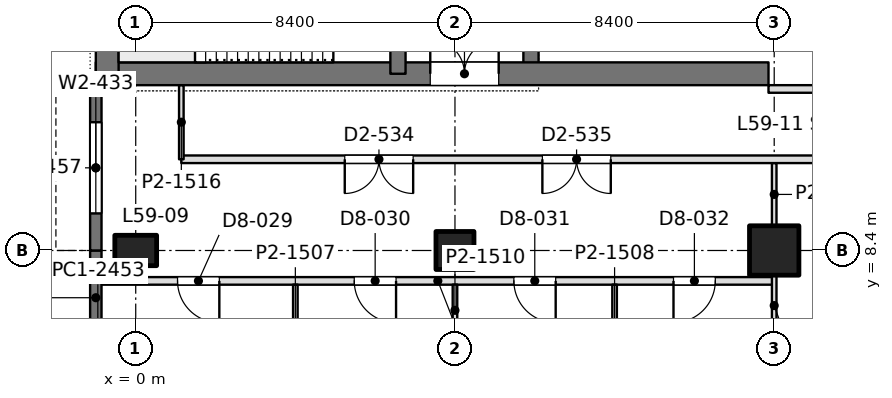
"""IFC4 building model, lengths in metres.
Left out: names, types, materials, properties, quantities, classifications, styles, units other than length and angle.
Written with IfcOpenShell. Run it as: python <this file> out.ifc"""

import sys

from ifc_helpers import new_model, si_unit, direction, frame, frame_2d, origin, origin_2d, place, context, subcontext, project, spatial, rectangle, extrude, element, fill, save


model = new_model("IFC4")
c1 = context("Model", 3, precision=1e-05, world=origin(), true_north=direction((0.0, 1.0)))
c2 = subcontext(c1, "Body", "Model", "MODEL_VIEW")
j1 = project(units=[si_unit("LENGTHUNIT", "METRE"), si_unit("PLANEANGLEUNIT", "RADIAN")], contexts=[c1])
p1 = place(None, origin())
s1 = spatial("IfcSite", under=j1, at=p1, CompositionType="ELEMENT")
p2 = place(p1, origin())
s2 = spatial("IfcBuilding", under=s1, at=p2, CompositionType="ELEMENT")
p3 = place(p2, frame((0.0, 0.0, 259.2)))
s3 = spatial("IfcBuildingStorey", under=s2, at=p3, CompositionType="ELEMENT", Elevation=259.2)
p4 = place(p3, frame((0.0, 8.4, 0.0), z_axis=(0.0, 0.0, 1.0), x_axis=(0.0, 1.0, 0.0)))
e1 = element("IfcColumn", 1, at=p4, inside=s3, PredefinedType="COLUMN", context=c2, shape_type="SweptSolid", body=[
    extrude(rectangle(XDim=0.8, YDim=1.1, at=origin_2d()), origin(), (0.0, 0.0, 1.0), 4.5),
])
p5 = place(p3, frame((8.4, 8.4, 0.0), z_axis=(0.0, 0.0, 1.0), x_axis=(1.0, 0.0, 0.0)))
e2 = element("IfcColumn", 2, at=p5, inside=s3, PredefinedType="COLUMN", context=c2, shape_type="SweptSolid", body=[
    extrude(rectangle(XDim=1.0, YDim=1.0, at=origin_2d()), origin(), (0.0, 0.0, 1.0), 4.5),
])
p6 = place(p3, frame((16.8, 8.4, 0.0), z_axis=(0.0, 0.0, 1.0), x_axis=(1.0, 0.0, 0.0)))
e3 = element("IfcColumn", 3, at=p6, inside=s3, PredefinedType="COLUMN", context=c2, shape_type="SweptSolid", body=[
    extrude(rectangle(XDim=1.3, YDim=1.3, at=origin_2d()), origin(), (0.0, 0.0, 1.0), 4.5),
])
p7 = place(p3, frame((-1.05, 13.05, 0.0), z_axis=(0.0, 0.0, 1.0), x_axis=(1.0, 0.0, 0.0)))
e4 = element("IfcWall", 4, at=p7, inside=s3, PredefinedType="SHEAR", context=c2, shape_type="SweptSolid", body=[
    extrude(rectangle(XDim=17.7, YDim=0.6, at=frame_2d((8.85, 0.0))), origin(), (0.0, 0.0, 1.0), 4.5),
])
p8 = place(p7, frame((8.8, 0.0, 0.0)))
e5 = element("IfcOpeningElement", 5, at=p8, cuts=e4, PredefinedType="OPENING", context=c2, shape_type="SweptSolid", body=[
    extrude(rectangle(XDim=1.8, YDim=2.4, at=frame_2d((0.9, 1.2))), frame((0.0, 0.31, 0.0), z_axis=(0.0, -1.0, 0.0), x_axis=(1.0, 0.0, 0.0)), (0.0, 0.0, 1.0), 0.62),
])
p9 = place(p3, frame((-0.75, 13.05, 0.0), z_axis=(0.0, 0.0, 1.0), x_axis=(0.0, 1.0, 0.0)))
e6 = element("IfcWall", 6, at=p9, inside=s3, PredefinedType="SHEAR", context=c2, shape_type="SweptSolid", body=[
    extrude(rectangle(XDim=24.3, YDim=0.6, at=frame_2d((12.15, 0.0))), origin(), (0.0, 0.0, 1.0), 4.5),
])
p10 = place(p3, frame((6.9, 13.05, 0.0), z_axis=(0.0, 0.0, 1.0), x_axis=(0.0, 1.0, 0.0)))
e7 = element("IfcWall", 7, at=p10, inside=s3, PredefinedType="SHEAR", context=c2, shape_type="SweptSolid", body=[
    extrude(rectangle(XDim=24.3, YDim=0.4, at=frame_2d((12.15, 0.0))), origin(), (0.0, 0.0, 1.0), 4.5),
])
p11 = place(p10, frame((1.3, 0.0, 0.0)))
e8 = element("IfcOpeningElement", 8, at=p11, cuts=e7, PredefinedType="OPENING", context=c2, shape_type="SweptSolid", body=[
    extrude(rectangle(XDim=1.0, YDim=2.2, at=frame_2d((0.5, 1.1))), frame((0.0, 0.21, 0.0), z_axis=(0.0, -1.0, 0.0), x_axis=(1.0, 0.0, 0.0)), (0.0, 0.0, 1.0), 0.42),
])
p12 = place(p10, frame((22.0, 0.0, 0.0)))
e9 = element("IfcOpeningElement", 9, at=p12, cuts=e7, PredefinedType="OPENING", context=c2, shape_type="SweptSolid", body=[
    extrude(rectangle(XDim=1.0, YDim=2.2, at=frame_2d((0.5, 1.1))), frame((0.0, 0.21, 0.0), z_axis=(0.0, -1.0, 0.0), x_axis=(1.0, 0.0, 0.0)), (0.0, 0.0, 1.0), 0.42),
])
p13 = place(p10, frame((5.55, 0.0, 0.0)))
e10 = element("IfcOpeningElement", 10, at=p13, cuts=e7, PredefinedType="OPENING", context=c2, shape_type="SweptSolid", body=[
    extrude(rectangle(XDim=1.0, YDim=2.2, at=frame_2d((0.5, 1.1))), frame((0.0, 0.21, 0.0), z_axis=(0.0, -1.0, 0.0), x_axis=(1.0, 0.0, 0.0)), (0.0, 0.0, 1.0), 0.42),
])
p14 = place(p10, frame((9.55, 0.0, 0.0)))
e11 = element("IfcOpeningElement", 11, at=p14, cuts=e7, PredefinedType="OPENING", context=c2, shape_type="SweptSolid", body=[
    extrude(rectangle(XDim=1.0, YDim=2.2, at=frame_2d((0.5, 1.1))), frame((0.0, 0.21, 0.0), z_axis=(0.0, -1.0, 0.0), x_axis=(1.0, 0.0, 0.0)), (0.0, 0.0, 1.0), 0.42),
])
p15 = place(p10, frame((12.8, 0.0, 0.0)))
e12 = element("IfcOpeningElement", 12, at=p15, cuts=e7, PredefinedType="OPENING", context=c2, shape_type="SweptSolid", body=[
    extrude(rectangle(XDim=1.1, YDim=2.2, at=frame_2d((0.55, 1.1))), frame((0.0, 0.21, 0.0), z_axis=(0.0, -1.0, 0.0), x_axis=(1.0, 0.0, 0.0)), (0.0, 0.0, 1.0), 0.42),
])
p16 = place(p10, frame((15.538, 0.0, 0.0)))
e13 = element("IfcOpeningElement", 13, at=p16, cuts=e7, PredefinedType="OPENING", context=c2, shape_type="SweptSolid", body=[
    extrude(rectangle(XDim=1.1, YDim=2.2, at=frame_2d((0.55, 1.1))), frame((0.0, 0.21, 0.0), z_axis=(0.0, -1.0, 0.0), x_axis=(1.0, 0.0, 0.0)), (0.0, 0.0, 1.0), 0.42),
])
p17 = place(p10, frame((18.262, 0.0, 0.0)))
e14 = element("IfcOpeningElement", 14, at=p17, cuts=e7, PredefinedType="OPENING", context=c2, shape_type="SweptSolid", body=[
    extrude(rectangle(XDim=1.1, YDim=2.2, at=frame_2d((0.55, 1.1))), frame((0.0, 0.21, 0.0), z_axis=(0.0, -1.0, 0.0), x_axis=(1.0, 0.0, 0.0)), (0.0, 0.0, 1.0), 0.42),
])
p18 = place(p3, frame((10.4, 13.05, 0.0), z_axis=(0.0, 0.0, 1.0), x_axis=(0.0, 1.0, 0.0)))
e15 = element("IfcWall", 15, at=p18, inside=s3, PredefinedType="SHEAR", context=c2, shape_type="SweptSolid", body=[
    extrude(rectangle(XDim=24.3, YDim=0.4, at=frame_2d((12.15, 0.0))), origin(), (0.0, 0.0, 1.0), 4.5),
])
p19 = place(p18, frame((15.75, 0.0, 0.0)))
e16 = element("IfcOpeningElement", 16, at=p19, cuts=e15, PredefinedType="OPENING", context=c2, shape_type="SweptSolid", body=[
    extrude(rectangle(XDim=1.1, YDim=2.2, at=frame_2d((0.55, 1.1))), frame((0.0, 0.21, 0.0), z_axis=(0.0, -1.0, 0.0), x_axis=(1.0, 0.0, 0.0)), (0.0, 0.0, 1.0), 0.42),
])
p20 = place(p18, frame((18.6, 0.0, 0.0)))
e17 = element("IfcOpeningElement", 17, at=p20, cuts=e15, PredefinedType="OPENING", context=c2, shape_type="SweptSolid", body=[
    extrude(rectangle(XDim=1.1, YDim=2.2, at=frame_2d((0.55, 1.1))), frame((0.0, 0.21, 0.0), z_axis=(0.0, -1.0, 0.0), x_axis=(1.0, 0.0, 0.0)), (0.0, 0.0, 1.0), 0.42),
])
p21 = place(p18, frame((21.45, 0.0, 0.0)))
e18 = element("IfcOpeningElement", 18, at=p21, cuts=e15, PredefinedType="OPENING", context=c2, shape_type="SweptSolid", body=[
    extrude(rectangle(XDim=1.1, YDim=2.2, at=frame_2d((0.55, 1.1))), frame((0.0, 0.21, 0.0), z_axis=(0.0, -1.0, 0.0), x_axis=(1.0, 0.0, 0.0)), (0.0, 0.0, 1.0), 0.42),
])
p22 = place(p18, frame((8.65, 0.0, 0.0)))
e19 = element("IfcOpeningElement", 19, at=p22, cuts=e15, PredefinedType="OPENING", context=c2, shape_type="SweptSolid", body=[
    extrude(rectangle(XDim=1.8, YDim=2.4, at=frame_2d((0.9, 1.2))), frame((0.0, 0.21, 0.0), z_axis=(0.0, -1.0, 0.0), x_axis=(1.0, 0.0, 0.0)), (0.0, 0.0, 1.0), 0.42),
])
p23 = place(p3, frame((-1.05, 5.915, 0.0), z_axis=(0.0, 0.0, 1.0), x_axis=(0.0, 1.0, 0.0)))
e20 = element("IfcWall", 20, at=p23, inside=s3, PredefinedType="SOLIDWALL", context=c2, shape_type="SweptSolid", body=[
    extrude(rectangle(XDim=2.485, YDim=0.3, at=frame_2d((1.243, 0.0))), origin(), (0.0, 0.0, 1.0), 4.35),
])
p24 = place(p3, frame((-1.05, 8.4, 0.0), z_axis=(0.0, 0.0, 1.0), x_axis=(0.0, 1.0, 0.0)))
e21 = element("IfcWall", 21, at=p24, inside=s3, PredefinedType="SOLIDWALL", context=c2, shape_type="SweptSolid", body=[
    extrude(rectangle(XDim=4.35, YDim=0.3, at=frame_2d((2.175, 0.0))), origin(), (0.0, 0.0, 1.0), 4.35),
])
p25 = place(p24, frame((0.975, 0.0, 0.9)))
e22 = element("IfcOpeningElement", 22, at=p25, cuts=e21, PredefinedType="OPENING", context=c2, shape_type="SweptSolid", body=[
    extrude(rectangle(XDim=2.4, YDim=1.9, at=frame_2d((1.2, 0.95))), frame((0.0, 0.16, 0.0), z_axis=(0.0, -1.0, 0.0), x_axis=(1.0, 0.0, 0.0)), (0.0, 0.0, 1.0), 0.32),
])
p26 = place(p3, frame((-0.902, 7.6, 0.0), z_axis=(0.0, 0.0, 1.0), x_axis=(1.0, 0.0, 0.0)))
e23 = element("IfcWall", 23, at=p26, inside=s3, PredefinedType="PARTITIONING", context=c2, shape_type="SweptSolid", body=[
    extrude(rectangle(XDim=17.702, YDim=0.2, at=frame_2d((8.851, 0.0))), origin(), (0.0, 0.0, 1.0), 3.86),
])
p27 = place(p26, frame((2.002, 0.0, 0.0)))
e24 = element("IfcOpeningElement", 24, at=p27, cuts=e23, PredefinedType="OPENING", context=c2, shape_type="SweptSolid", body=[
    extrude(rectangle(XDim=1.1, YDim=2.4, at=frame_2d((0.55, 1.2))), frame((0.0, 0.11, 0.0), z_axis=(0.0, -1.0, 0.0), x_axis=(1.0, 0.0, 0.0)), (0.0, 0.0, 1.0), 0.22),
])
p28 = place(p26, frame((6.652, 0.0, 0.0)))
e25 = element("IfcOpeningElement", 25, at=p28, cuts=e23, PredefinedType="OPENING", context=c2, shape_type="SweptSolid", body=[
    extrude(rectangle(XDim=1.1, YDim=2.4, at=frame_2d((0.55, 1.2))), frame((0.0, 0.11, 0.0), z_axis=(0.0, -1.0, 0.0), x_axis=(1.0, 0.0, 0.0)), (0.0, 0.0, 1.0), 0.22),
])
p29 = place(p26, frame((10.852, 0.0, 0.0)))
e26 = element("IfcOpeningElement", 26, at=p29, cuts=e23, PredefinedType="OPENING", context=c2, shape_type="SweptSolid", body=[
    extrude(rectangle(XDim=1.1, YDim=2.4, at=frame_2d((0.55, 1.2))), frame((0.0, 0.11, 0.0), z_axis=(0.0, -1.0, 0.0), x_axis=(1.0, 0.0, 0.0)), (0.0, 0.0, 1.0), 0.22),
])
p30 = place(p26, frame((15.052, 0.0, 0.0)))
e27 = element("IfcOpeningElement", 27, at=p30, cuts=e23, PredefinedType="OPENING", context=c2, shape_type="SweptSolid", body=[
    extrude(rectangle(XDim=1.1, YDim=2.4, at=frame_2d((0.55, 1.2))), frame((0.0, 0.11, 0.0), z_axis=(0.0, -1.0, 0.0), x_axis=(1.0, 0.0, 0.0)), (0.0, 0.0, 1.0), 0.22),
])
p31 = place(p3, frame((4.2, 4.7, 0.0), z_axis=(0.0, 0.0, 1.0), x_axis=(0.0, 1.0, 0.0)))
e28 = element("IfcWall", 28, at=p31, inside=s3, PredefinedType="PARTITIONING", context=c2, shape_type="SweptSolid", body=[
    extrude(rectangle(XDim=2.802, YDim=0.12, at=frame_2d((1.401, 0.0))), origin(), (0.0, 0.0, 1.0), 3.86),
])
p32 = place(p3, frame((8.4, 6.149, 0.0), z_axis=(0.0, 0.0, 1.0), x_axis=(0.0, 1.0, 0.0)))
e29 = element("IfcWall", 29, at=p32, inside=s3, PredefinedType="PARTITIONING", context=c2, shape_type="SweptSolid", body=[
    extrude(rectangle(XDim=1.353, YDim=0.12, at=frame_2d((0.677, 0.0))), origin(), (0.0, 0.0, 1.0), 3.99),
])
p33 = place(p3, frame((12.6, 4.7, 0.0), z_axis=(0.0, 0.0, 1.0), x_axis=(0.0, 1.0, 0.0)))
e30 = element("IfcWall", 30, at=p33, inside=s3, PredefinedType="PARTITIONING", context=c2, shape_type="SweptSolid", body=[
    extrude(rectangle(XDim=2.802, YDim=0.12, at=frame_2d((1.401, 0.0))), origin(), (0.0, 0.0, 1.0), 3.86),
])
p34 = place(p3, frame((16.8, 6.149, 0.0), z_axis=(0.0, 0.0, 1.0), x_axis=(0.0, 1.0, 0.0)))
e31 = element("IfcWall", 31, at=p34, inside=s3, PredefinedType="PARTITIONING", context=c2, shape_type="SweptSolid", body=[
    extrude(rectangle(XDim=1.603, YDim=0.12, at=frame_2d((0.802, 0.0))), origin(), (0.0, 0.0, 1.0), 3.99),
])
p35 = place(p3, frame((16.8, 9.049, 0.0), z_axis=(0.0, 0.0, 1.0), x_axis=(0.0, 1.0, 0.0)))
e32 = element("IfcWall", 32, at=p35, inside=s3, PredefinedType="PARTITIONING", context=c2, shape_type="SweptSolid", body=[
    extrude(rectangle(XDim=1.653, YDim=0.12, at=frame_2d((0.826, 0.0))), origin(), (0.0, 0.0, 1.0), 3.99),
])
p36 = place(p3, frame((1.2, 10.8, 0.0), z_axis=(0.0, 0.0, 1.0), x_axis=(1.0, 0.0, 0.0)))
e33 = element("IfcWall", 33, at=p36, inside=s3, PredefinedType="PARTITIONING", context=c2, shape_type="SweptSolid", body=[
    extrude(rectangle(XDim=41.452, YDim=0.2, at=frame_2d((20.726, 0.0))), origin(), (0.0, 0.0, 1.0), 3.8),
])
p37 = place(p36, frame((4.3, 0.0, 0.0)))
e34 = element("IfcOpeningElement", 34, at=p37, cuts=e33, PredefinedType="OPENING", context=c2, shape_type="SweptSolid", body=[
    extrude(rectangle(XDim=1.8, YDim=2.2, at=frame_2d((0.9, 1.1))), frame((0.0, 0.11, 0.0), z_axis=(0.0, -1.0, 0.0), x_axis=(1.0, 0.0, 0.0)), (0.0, 0.0, 1.0), 0.22),
])
p38 = place(p36, frame((9.5, 0.0, 0.0)))
e35 = element("IfcOpeningElement", 35, at=p38, cuts=e33, PredefinedType="OPENING", context=c2, shape_type="SweptSolid", body=[
    extrude(rectangle(XDim=1.8, YDim=2.2, at=frame_2d((0.9, 1.1))), frame((0.0, 0.11, 0.0), z_axis=(0.0, -1.0, 0.0), x_axis=(1.0, 0.0, 0.0)), (0.0, 0.0, 1.0), 0.22),
])
p39 = place(p36, frame((20.3, 0.0, 0.0)))
e36 = element("IfcOpeningElement", 36, at=p39, cuts=e33, PredefinedType="OPENING", context=c2, shape_type="SweptSolid", body=[
    extrude(rectangle(XDim=1.8, YDim=2.2, at=frame_2d((0.9, 1.1))), frame((0.0, 0.11, 0.0), z_axis=(0.0, -1.0, 0.0), x_axis=(1.0, 0.0, 0.0)), (0.0, 0.0, 1.0), 0.22),
])
p40 = place(p36, frame((25.9, 0.0, 0.0)))
e37 = element("IfcOpeningElement", 37, at=p40, cuts=e33, PredefinedType="OPENING", context=c2, shape_type="SweptSolid", body=[
    extrude(rectangle(XDim=1.8, YDim=2.2, at=frame_2d((0.9, 1.1))), frame((0.0, 0.11, 0.0), z_axis=(0.0, -1.0, 0.0), x_axis=(1.0, 0.0, 0.0)), (0.0, 0.0, 1.0), 0.22),
])
p41 = place(p36, frame((34.517, 0.0, 0.0)))
e38 = element("IfcOpeningElement", 38, at=p41, cuts=e33, PredefinedType="OPENING", context=c2, shape_type="SweptSolid", body=[
    extrude(rectangle(XDim=1.8, YDim=2.2, at=frame_2d((0.9, 1.1))), frame((0.0, 0.11, 0.0), z_axis=(0.0, -1.0, 0.0), x_axis=(1.0, 0.0, 0.0)), (0.0, 0.0, 1.0), 0.22),
])
p42 = place(p36, frame((37.533, 0.0, 0.0)))
e39 = element("IfcOpeningElement", 39, at=p42, cuts=e33, PredefinedType="OPENING", context=c2, shape_type="SweptSolid", body=[
    extrude(rectangle(XDim=1.8, YDim=2.2, at=frame_2d((0.9, 1.1))), frame((0.0, 0.11, 0.0), z_axis=(0.0, -1.0, 0.0), x_axis=(1.0, 0.0, 0.0)), (0.0, 0.0, 1.0), 0.22),
])
p43 = place(p3, frame((1.2, 10.8, 0.0), z_axis=(0.0, 0.0, 1.0), x_axis=(0.0, 1.0, 0.0)))
e40 = element("IfcWall", 40, at=p43, inside=s3, PredefinedType="PARTITIONING", context=c2, shape_type="SweptSolid", body=[
    extrude(rectangle(XDim=1.952, YDim=0.12, at=frame_2d((0.976, 0.0))), origin(), (0.0, 0.0, 1.0), 4.35),
])
p44 = place(p3, frame((16.65, 12.65, 0.0), z_axis=(0.0, 0.0, 1.0), x_axis=(1.0, 0.0, 0.0)))
e41 = element("IfcWall", 41, at=p44, inside=s3, PredefinedType="PARTITIONING", context=c2, shape_type="SweptSolid", body=[
    extrude(rectangle(XDim=17.1, YDim=0.2, at=frame_2d((8.55, 0.0))), origin(), (0.0, 0.0, 1.0), 3.8),
])
p45 = place(p44, frame((3.8, 0.0, 0.0)))
e42 = element("IfcOpeningElement", 42, at=p45, cuts=e41, PredefinedType="OPENING", context=c2, shape_type="SweptSolid", body=[
    extrude(rectangle(XDim=1.1, YDim=2.4, at=frame_2d((0.55, 1.2))), frame((0.0, 0.11, 0.0), z_axis=(0.0, -1.0, 0.0), x_axis=(1.0, 0.0, 0.0)), (0.0, 0.0, 1.0), 0.22),
])
p46 = place(p44, frame((12.2, 0.0, 0.0)))
e43 = element("IfcOpeningElement", 43, at=p46, cuts=e41, PredefinedType="OPENING", context=c2, shape_type="SweptSolid", body=[
    extrude(rectangle(XDim=1.1, YDim=2.4, at=frame_2d((0.55, 1.2))), frame((0.0, 0.11, 0.0), z_axis=(0.0, -1.0, 0.0), x_axis=(1.0, 0.0, 0.0)), (0.0, 0.0, 1.0), 0.22),
])
p47 = place(p25, origin())
e44 = element("IfcWindow", 44, at=p47, inside=s3, PartitioningType="SINGLE_PANEL", PredefinedType="WINDOW", context=c2, shape_type="SweptSolid", body=[
    extrude(rectangle(XDim=2.4, YDim=1.9, at=frame_2d((1.2, 0.95))), frame((0.0, 0.03, 0.0), z_axis=(0.0, -1.0, 0.0), x_axis=(1.0, 0.0, 0.0)), (0.0, 0.0, 1.0), 0.06),
])
fill(e22, e44)
p48 = place(p8, origin())
e45 = element("IfcDoor", 45, at=p48, inside=s3, OperationType="DOUBLE_DOOR_SINGLE_SWING", PredefinedType="DOOR", context=c2, shape_type="SweptSolid", body=[
    extrude(rectangle(XDim=1.8, YDim=2.4, at=frame_2d((0.9, 1.2))), frame((0.0, 0.025, 0.0), z_axis=(0.0, -1.0, 0.0), x_axis=(1.0, 0.0, 0.0)), (0.0, 0.0, 1.0), 0.05),
])
fill(e5, e45)
p49 = place(p27, frame((1.1, 0.0, 0.0), z_axis=(0.0, 0.0, 1.0), x_axis=(-1.0, 0.0, 0.0)))
e46 = element("IfcDoor", 46, at=p49, inside=s3, OperationType="SINGLE_SWING_LEFT", PredefinedType="DOOR", context=c2, shape_type="SweptSolid", body=[
    extrude(rectangle(XDim=1.1, YDim=2.4, at=frame_2d((0.55, 1.2))), frame((0.0, 0.025, 0.0), z_axis=(0.0, -1.0, 0.0), x_axis=(1.0, 0.0, 0.0)), (0.0, 0.0, 1.0), 0.05),
])
fill(e24, e46)
p50 = place(p28, frame((1.1, 0.0, 0.0), z_axis=(0.0, 0.0, 1.0), x_axis=(-1.0, 0.0, 0.0)))
e47 = element("IfcDoor", 47, at=p50, inside=s3, OperationType="SINGLE_SWING_LEFT", PredefinedType="DOOR", context=c2, shape_type="SweptSolid", body=[
    extrude(rectangle(XDim=1.1, YDim=2.4, at=frame_2d((0.55, 1.2))), frame((0.0, 0.025, 0.0), z_axis=(0.0, -1.0, 0.0), x_axis=(1.0, 0.0, 0.0)), (0.0, 0.0, 1.0), 0.05),
])
fill(e25, e47)
p51 = place(p29, frame((1.1, 0.0, 0.0), z_axis=(0.0, 0.0, 1.0), x_axis=(-1.0, 0.0, 0.0)))
e48 = element("IfcDoor", 48, at=p51, inside=s3, OperationType="SINGLE_SWING_LEFT", PredefinedType="DOOR", context=c2, shape_type="SweptSolid", body=[
    extrude(rectangle(XDim=1.1, YDim=2.4, at=frame_2d((0.55, 1.2))), frame((0.0, 0.025, 0.0), z_axis=(0.0, -1.0, 0.0), x_axis=(1.0, 0.0, 0.0)), (0.0, 0.0, 1.0), 0.05),
])
fill(e26, e48)
p52 = place(p30, frame((1.1, 0.0, 0.0), z_axis=(0.0, 0.0, 1.0), x_axis=(-1.0, 0.0, 0.0)))
e49 = element("IfcDoor", 49, at=p52, inside=s3, OperationType="SINGLE_SWING_RIGHT", PredefinedType="DOOR", context=c2, shape_type="SweptSolid", body=[
    extrude(rectangle(XDim=1.1, YDim=2.4, at=frame_2d((0.55, 1.2))), frame((0.0, 0.025, 0.0), z_axis=(0.0, -1.0, 0.0), x_axis=(1.0, 0.0, 0.0)), (0.0, 0.0, 1.0), 0.05),
])
fill(e27, e49)
p53 = place(p37, frame((1.8, 0.0, 0.0), z_axis=(0.0, 0.0, 1.0), x_axis=(-1.0, 0.0, 0.0)))
e50 = element("IfcDoor", 50, at=p53, inside=s3, OperationType="DOUBLE_DOOR_SINGLE_SWING", PredefinedType="DOOR", context=c2, shape_type="SweptSolid", body=[
    extrude(rectangle(XDim=1.8, YDim=2.2, at=frame_2d((0.9, 1.1))), frame((0.0, 0.025, 0.0), z_axis=(0.0, -1.0, 0.0), x_axis=(1.0, 0.0, 0.0)), (0.0, 0.0, 1.0), 0.05),
])
fill(e34, e50)
p54 = place(p38, frame((1.8, 0.0, 0.0), z_axis=(0.0, 0.0, 1.0), x_axis=(-1.0, 0.0, 0.0)))
e51 = element("IfcDoor", 51, at=p54, inside=s3, OperationType="DOUBLE_DOOR_SINGLE_SWING", PredefinedType="DOOR", context=c2, shape_type="SweptSolid", body=[
    extrude(rectangle(XDim=1.8, YDim=2.2, at=frame_2d((0.9, 1.1))), frame((0.0, 0.025, 0.0), z_axis=(0.0, -1.0, 0.0), x_axis=(1.0, 0.0, 0.0)), (0.0, 0.0, 1.0), 0.05),
])
fill(e35, e51)
save(model, sys.argv[1])
